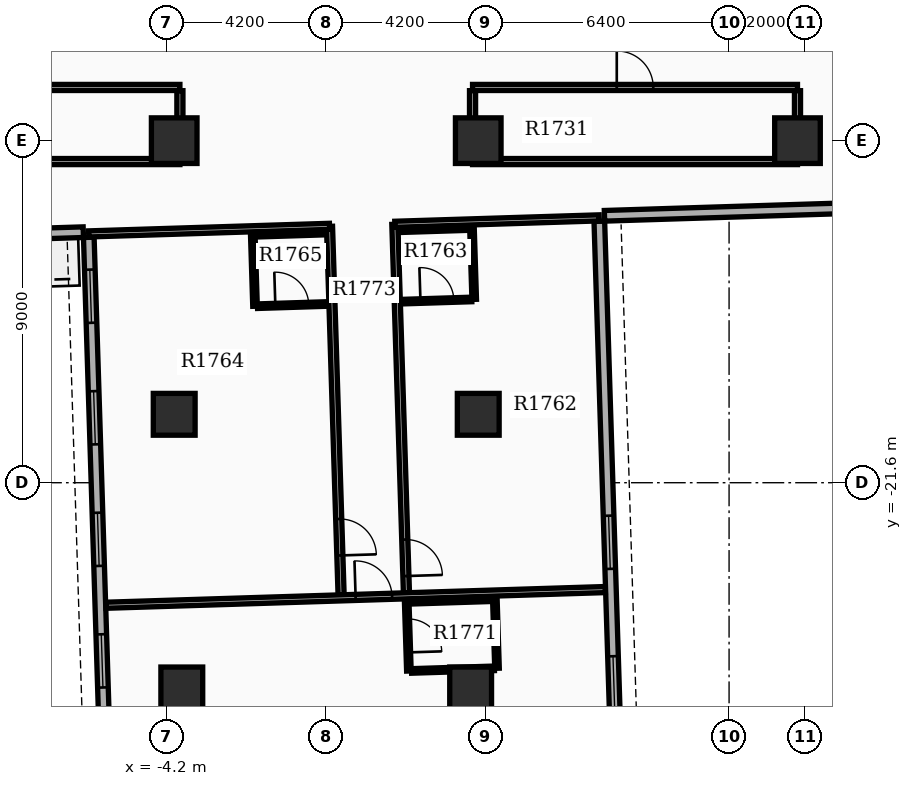
"""IFC4 building model, lengths in metres.
Left out: names, types, materials, properties, quantities, classifications, styles, units other than length and angle.
Written with IfcOpenShell. Run it as: python <this file> out.ifc"""

import sys

from ifc_helpers import new_model, si_unit, direction, frame, frame_2d, origin, origin_2d, place, context, subcontext, project, spatial, rectangle, extrude, element, fill, save


model = new_model("IFC4")
c1 = context("Model", 3, precision=1e-05, world=origin(), true_north=direction((0.0, 1.0)))
c2 = subcontext(c1, "Body", "Model", "MODEL_VIEW")
j1 = project(units=[si_unit("LENGTHUNIT", "METRE"), si_unit("PLANEANGLEUNIT", "RADIAN")], contexts=[c1])
p1 = place(None, origin())
s1 = spatial("IfcSite", under=j1, at=p1, CompositionType="ELEMENT")
p2 = place(p1, origin())
s2 = spatial("IfcBuilding", under=s1, at=p2, CompositionType="ELEMENT")
p3 = place(p2, frame((0.0, 0.0, 112.5)))
s3 = spatial("IfcBuildingStorey", under=s2, at=p3, CompositionType="ELEMENT", Elevation=112.5)
for number, where, z_axis, x_axis in (
    (1, (12.4, -12.6, 0.0), (0.0, 0.0, 1.0), (1.0, 0.0, 0.0)),
    (2, (-4.0, -12.6, 0.0), (0.0, 0.0, 1.0), (1.0, 0.0, 0.0)),
    (3, (4.0, -12.6, 0.0), (0.0, 0.0, 1.0), (1.0, 0.0, 0.0)),
):
    element("IfcColumn", number, at=place(p3, frame(where, z_axis=z_axis, x_axis=x_axis)), inside=s3, PredefinedType="COLUMN", context=c2, shape_type="SweptSolid", body=[
        extrude(rectangle(XDim=1.2, YDim=1.2, at=origin_2d()), origin(), (0.0, 0.0, 1.0), 3.9),
    ])
for number, where, z_axis, x_axis in (
    (4, (-4.0, -19.8, 0.0), (0.0, 0.0, 1.0), (1.0, 0.0, 0.0)),
    (5, (4.0, -19.8, 0.0), (0.0, 0.0, 1.0), (1.0, 0.0, 0.0)),
    (6, (-3.8, -27.0, 0.0), (0.0, 0.0, 1.0), (1.0, 0.0, 0.0)),
    (7, (3.8, -27.0, 0.0), (0.0, 0.0, 1.0), (1.0, 0.0, 0.0)),
):
    element("IfcColumn", number, at=place(p3, frame(where, z_axis=z_axis, x_axis=x_axis)), inside=s3, PredefinedType="COLUMN", context=c2, shape_type="SweptSolid", body=[
        extrude(rectangle(XDim=1.1, YDim=1.1, at=origin_2d()), origin(), (0.0, 0.0, 1.0), 3.9),
    ])
p4 = place(p3, frame((-6.247, -15.144, 0.0), z_axis=(0.0, 0.0, 1.0), x_axis=(0.031398187845, -0.999506955354, 0.0)))
e8 = element("IfcWall", 8, at=p4, inside=s3, PredefinedType="STANDARD", context=c2, shape_type="SweptSolid", body=[
    extrude(rectangle(XDim=20.1, YDim=0.28, at=frame_2d((10.05, 0.0))), origin(), (0.0, 0.0, 1.0), 2.97),
])
p5 = place(p4, frame((0.85, 0.0, 0.8)))
e9 = element("IfcOpeningElement", 9, at=p5, cuts=e8, PredefinedType="OPENING", context=c2, shape_type="SweptSolid", body=[
    extrude(rectangle(XDim=1.4, YDim=1.6, at=frame_2d((0.7, 0.8))), frame((0.0, 0.15, 0.0), z_axis=(0.0, -1.0, 0.0), x_axis=(1.0, 0.0, 0.0)), (0.0, 0.0, 1.0), 0.3),
])
p6 = place(p4, frame((4.05, 0.0, 0.8)))
e10 = element("IfcOpeningElement", 10, at=p6, cuts=e8, PredefinedType="OPENING", context=c2, shape_type="SweptSolid", body=[
    extrude(rectangle(XDim=1.4, YDim=1.6, at=frame_2d((0.7, 0.8))), frame((0.0, 0.15, 0.0), z_axis=(0.0, -1.0, 0.0), x_axis=(1.0, 0.0, 0.0)), (0.0, 0.0, 1.0), 0.3),
])
p7 = place(p4, frame((7.25, 0.0, 0.8)))
e11 = element("IfcOpeningElement", 11, at=p7, cuts=e8, PredefinedType="OPENING", context=c2, shape_type="SweptSolid", body=[
    extrude(rectangle(XDim=1.4, YDim=1.6, at=frame_2d((0.7, 0.8))), frame((0.0, 0.15, 0.0), z_axis=(0.0, -1.0, 0.0), x_axis=(1.0, 0.0, 0.0)), (0.0, 0.0, 1.0), 0.3),
])
p8 = place(p4, frame((10.45, 0.0, 0.8)))
e12 = element("IfcOpeningElement", 12, at=p8, cuts=e8, PredefinedType="OPENING", context=c2, shape_type="SweptSolid", body=[
    extrude(rectangle(XDim=1.4, YDim=1.6, at=frame_2d((0.7, 0.8))), frame((0.0, 0.15, 0.0), z_axis=(0.0, -1.0, 0.0), x_axis=(1.0, 0.0, 0.0)), (0.0, 0.0, 1.0), 0.3),
])
p9 = place(p3, frame((7.817, -34.812, 0.0), z_axis=(0.0, 0.0, 1.0), x_axis=(-0.031410322165, 0.999506574096, 0.0)))
e13 = element("IfcWall", 13, at=p9, inside=s3, PredefinedType="STANDARD", context=c2, shape_type="SweptSolid", body=[
    extrude(rectangle(XDim=20.1, YDim=0.28, at=frame_2d((10.05, 0.0))), origin(), (0.0, 0.0, 1.0), 2.97),
])
p10 = place(p9, frame((0.85, 0.0, 0.8)))
e14 = element("IfcOpeningElement", 14, at=p10, cuts=e13, PredefinedType="OPENING", context=c2, shape_type="SweptSolid", body=[
    extrude(rectangle(XDim=1.4, YDim=1.6, at=frame_2d((0.7, 0.8))), frame((0.0, 0.15, 0.0), z_axis=(0.0, -1.0, 0.0), x_axis=(1.0, 0.0, 0.0)), (0.0, 0.0, 1.0), 0.3),
])
p11 = place(p9, frame((4.05, 0.0, 0.8)))
e15 = element("IfcOpeningElement", 15, at=p11, cuts=e13, PredefinedType="OPENING", context=c2, shape_type="SweptSolid", body=[
    extrude(rectangle(XDim=1.4, YDim=1.6, at=frame_2d((0.7, 0.8))), frame((0.0, 0.15, 0.0), z_axis=(0.0, -1.0, 0.0), x_axis=(1.0, 0.0, 0.0)), (0.0, 0.0, 1.0), 0.3),
])
p12 = place(p9, frame((7.25, 0.0, 0.8)))
e16 = element("IfcOpeningElement", 16, at=p12, cuts=e13, PredefinedType="OPENING", context=c2, shape_type="SweptSolid", body=[
    extrude(rectangle(XDim=1.4, YDim=1.6, at=frame_2d((0.7, 0.8))), frame((0.0, 0.15, 0.0), z_axis=(0.0, -1.0, 0.0), x_axis=(1.0, 0.0, 0.0)), (0.0, 0.0, 1.0), 0.3),
])
p13 = place(p9, frame((10.95, 0.0, 0.8)))
e17 = element("IfcOpeningElement", 17, at=p13, cuts=e13, PredefinedType="OPENING", context=c2, shape_type="SweptSolid", body=[
    extrude(rectangle(XDim=1.4, YDim=1.6, at=frame_2d((0.7, 0.8))), frame((0.0, 0.15, 0.0), z_axis=(0.0, -1.0, 0.0), x_axis=(1.0, 0.0, 0.0)), (0.0, 0.0, 1.0), 0.3),
])
p14 = place(p3, frame((-12.689, -15.206, 0.0), z_axis=(0.0, 0.0, 1.0), x_axis=(0.999507262922, 0.031388395416, 0.0)))
e18 = element("IfcWall", 18, at=p14, inside=s3, PredefinedType="STANDARD", context=c2, shape_type="SweptSolid", body=[
    extrude(rectangle(XDim=6.3, YDim=0.28, at=frame_2d((3.15, 0.0))), origin(), (0.0, 0.0, 1.0), 2.97),
])
p15 = place(p3, frame((13.618, -14.379, 0.0), z_axis=(0.0, 0.0, 1.0), x_axis=(-0.999507224741, -0.031389611199, 0.0)))
e19 = element("IfcWall", 19, at=p15, inside=s3, PredefinedType="STANDARD", context=c2, shape_type="SweptSolid", body=[
    extrude(rectangle(XDim=6.3, YDim=0.28, at=frame_2d((3.15, 0.0))), origin(), (0.0, 0.0, 1.0), 2.97),
])
p16 = place(p3, frame((-12.4, -13.15, 0.0), z_axis=(0.0, 0.0, 1.0), x_axis=(1.0, 0.0, 0.0)))
e20 = element("IfcWall", 20, at=p16, inside=s3, PredefinedType="PARTITIONING", context=c2, shape_type="SweptSolid", body=[
    extrude(rectangle(XDim=8.55, YDim=0.16, at=frame_2d((4.275, 0.0))), origin(), (0.0, 0.0, 1.0), 2.96),
])
p17 = place(p3, frame((-12.4, -11.2, 0.0), z_axis=(0.0, 0.0, 1.0), x_axis=(1.0, 0.0, 0.0)))
e21 = element("IfcWall", 21, at=p17, inside=s3, PredefinedType="PARTITIONING", context=c2, shape_type="SweptSolid", body=[
    extrude(rectangle(XDim=8.55, YDim=0.16, at=frame_2d((4.275, 0.0))), origin(), (0.0, 0.0, 1.0), 2.96),
])
p18 = place(p17, frame((3.795, 0.0, 0.0)))
e22 = element("IfcOpeningElement", 22, at=p18, cuts=e21, PredefinedType="OPENING", context=c2, shape_type="SweptSolid", body=[
    extrude(rectangle(XDim=0.96, YDim=2.15, at=frame_2d((0.48, 1.075))), frame((0.0, 0.09, 0.0), z_axis=(0.0, -1.0, 0.0), x_axis=(1.0, 0.0, 0.0)), (0.0, 0.0, 1.0), 0.18),
])
p19 = place(p3, frame((-3.85, -13.065, 0.0), z_axis=(0.0, 0.0, 1.0), x_axis=(0.0, 1.0, 0.0)))
e23 = element("IfcWall", 23, at=p19, inside=s3, PredefinedType="PARTITIONING", context=c2, shape_type="SweptSolid", body=[
    extrude(rectangle(XDim=1.78, YDim=0.16, at=frame_2d((0.89, 0.0))), origin(), (0.0, 0.0, 1.0), 2.96),
])
p20 = place(p3, frame((3.85, -13.15, 0.0), z_axis=(0.0, 0.0, 1.0), x_axis=(1.0, 0.0, 0.0)))
e24 = element("IfcWall", 24, at=p20, inside=s3, PredefinedType="PARTITIONING", context=c2, shape_type="SweptSolid", body=[
    extrude(rectangle(XDim=8.55, YDim=0.16, at=frame_2d((4.275, 0.0))), origin(), (0.0, 0.0, 1.0), 2.96),
])
p21 = place(p3, frame((3.85, -11.2, 0.0), z_axis=(0.0, 0.0, 1.0), x_axis=(1.0, 0.0, 0.0)))
e25 = element("IfcWall", 25, at=p21, inside=s3, PredefinedType="PARTITIONING", context=c2, shape_type="SweptSolid", body=[
    extrude(rectangle(XDim=8.55, YDim=0.16, at=frame_2d((4.275, 0.0))), origin(), (0.0, 0.0, 1.0), 2.96),
])
p22 = place(p21, frame((3.795, 0.0, 0.0)))
e26 = element("IfcOpeningElement", 26, at=p22, cuts=e25, PredefinedType="OPENING", context=c2, shape_type="SweptSolid", body=[
    extrude(rectangle(XDim=0.96, YDim=2.15, at=frame_2d((0.48, 1.075))), frame((0.0, 0.09, 0.0), z_axis=(0.0, -1.0, 0.0), x_axis=(1.0, 0.0, 0.0)), (0.0, 0.0, 1.0), 0.18),
])
for number, where, z_axis, x_axis in (
    (27, (3.85, -13.065, 0.0), (0.0, 0.0, 1.0), (0.0, 1.0, 0.0)),
    (28, (12.4, -13.065, 0.0), (0.0, 0.0, 1.0), (0.0, 1.0, 0.0)),
):
    element("IfcWall", number, at=place(p3, frame(where, z_axis=z_axis, x_axis=x_axis)), inside=s3, PredefinedType="PARTITIONING", context=c2, shape_type="SweptSolid", body=[
        extrude(rectangle(XDim=1.78, YDim=0.16, at=frame_2d((0.89, 0.0))), origin(), (0.0, 0.0, 1.0), 2.96),
    ])
p23 = place(p3, frame((1.806, -14.801, 0.0), z_axis=(0.0, 0.0, 1.0), x_axis=(0.031410762168, -0.999506560269, 0.0)))
e29 = element("IfcWall", 29, at=p23, inside=s3, PredefinedType="PARTITIONING", context=c2, shape_type="SweptSolid", body=[
    extrude(rectangle(XDim=9.7, YDim=0.16, at=frame_2d((4.85, 0.0))), origin(), (0.0, 0.0, 1.0), 2.96),
])
p24 = place(p23, frame((8.3, 0.0, 0.0)))
e30 = element("IfcOpeningElement", 30, at=p24, cuts=e29, PredefinedType="OPENING", context=c2, shape_type="SweptSolid", body=[
    extrude(rectangle(XDim=0.96, YDim=2.15, at=frame_2d((0.48, 1.075))), frame((0.0, 0.09, 0.0), z_axis=(0.0, -1.0, 0.0), x_axis=(1.0, 0.0, 0.0)), (0.0, 0.0, 1.0), 0.18),
])
p25 = place(p3, frame((1.806, -14.801, 0.0), z_axis=(0.0, 0.0, 1.0), x_axis=(0.999506793296, 0.031403346241, 0.0)))
e31 = element("IfcWall", 31, at=p25, inside=s3, PredefinedType="PARTITIONING", context=c2, shape_type="SweptSolid", body=[
    extrude(rectangle(XDim=5.38, YDim=0.16, at=frame_2d((2.69, 0.0))), origin(), (0.0, 0.0, 1.0), 2.96),
])
p26 = place(p3, frame((2.01, -16.835, 0.0), z_axis=(0.0, 0.0, 1.0), x_axis=(0.999507221803, 0.031389704724, 0.0)))
e32 = element("IfcWall", 32, at=p26, inside=s3, PredefinedType="PARTITIONING", context=c2, shape_type="SweptSolid", body=[
    extrude(rectangle(XDim=1.82, YDim=0.12, at=frame_2d((0.91, 0.0))), origin(), (0.0, 0.0, 1.0), 2.96),
])
p27 = place(p26, frame((0.47, 0.0, 0.0)))
e33 = element("IfcOpeningElement", 33, at=p27, cuts=e32, PredefinedType="OPENING", context=c2, shape_type="SweptSolid", body=[
    extrude(rectangle(XDim=0.88, YDim=2.1, at=frame_2d((0.44, 1.05))), frame((0.0, 0.07, 0.0), z_axis=(0.0, -1.0, 0.0), x_axis=(1.0, 0.0, 0.0)), (0.0, 0.0, 1.0), 0.14),
])
p28 = place(p3, frame((1.951, -14.956, 0.0), z_axis=(0.0, 0.0, 1.0), x_axis=(0.999507221803, 0.031389704724, 0.0)))
e34 = element("IfcWall", 34, at=p28, inside=s3, PredefinedType="PARTITIONING", context=c2, shape_type="SweptSolid", body=[
    extrude(rectangle(XDim=1.82, YDim=0.12, at=frame_2d((0.91, 0.0))), origin(), (0.0, 0.0, 1.0), 2.96),
])
p29 = place(p3, frame((3.835, -14.897, 0.0), z_axis=(0.0, 0.0, 1.0), x_axis=(0.031429371883, -0.999505975261, 0.0)))
e35 = element("IfcWall", 35, at=p29, inside=s3, PredefinedType="PARTITIONING", context=c2, shape_type="SweptSolid", body=[
    extrude(rectangle(XDim=1.88, YDim=0.12, at=frame_2d((0.94, 0.0))), origin(), (0.0, 0.0, 1.0), 2.96),
])
p30 = place(p3, frame((0.087, -14.854, 0.0), z_axis=(0.0, 0.0, 1.0), x_axis=(0.031410762168, -0.999506560269, 0.0)))
e36 = element("IfcWall", 36, at=p30, inside=s3, PredefinedType="PARTITIONING", context=c2, shape_type="SweptSolid", body=[
    extrude(rectangle(XDim=9.7, YDim=0.16, at=frame_2d((4.85, 0.0))), origin(), (0.0, 0.0, 1.0), 2.96),
])
p31 = place(p30, frame((7.704, 0.0, 0.0)))
e37 = element("IfcOpeningElement", 37, at=p31, cuts=e36, PredefinedType="OPENING", context=c2, shape_type="SweptSolid", body=[
    extrude(rectangle(XDim=0.96, YDim=2.15, at=frame_2d((0.48, 1.075))), frame((0.0, 0.09, 0.0), z_axis=(0.0, -1.0, 0.0), x_axis=(1.0, 0.0, 0.0)), (0.0, 0.0, 1.0), 0.18),
])
p32 = place(p3, frame((0.087, -14.854, 0.0), z_axis=(0.0, 0.0, 1.0), x_axis=(-0.999506197806, -0.031422293782, 0.0)))
e38 = element("IfcWall", 38, at=p32, inside=s3, PredefinedType="PARTITIONING", context=c2, shape_type="SweptSolid", body=[
    extrude(rectangle(XDim=6.34, YDim=0.16, at=frame_2d((3.17, 0.0))), origin(), (0.0, 0.0, 1.0), 2.96),
])
p33 = place(p3, frame((-1.808, -16.955, 0.0), z_axis=(0.0, 0.0, 1.0), x_axis=(0.999507221803, 0.031389704724, 0.0)))
e39 = element("IfcWall", 39, at=p33, inside=s3, PredefinedType="PARTITIONING", context=c2, shape_type="SweptSolid", body=[
    extrude(rectangle(XDim=1.82, YDim=0.12, at=frame_2d((0.91, 0.0))), origin(), (0.0, 0.0, 1.0), 2.96),
])
p34 = place(p33, frame((0.47, 0.0, 0.0)))
e40 = element("IfcOpeningElement", 40, at=p34, cuts=e39, PredefinedType="OPENING", context=c2, shape_type="SweptSolid", body=[
    extrude(rectangle(XDim=0.88, YDim=2.1, at=frame_2d((0.44, 1.05))), frame((0.0, 0.07, 0.0), z_axis=(0.0, -1.0, 0.0), x_axis=(1.0, 0.0, 0.0)), (0.0, 0.0, 1.0), 0.14),
])
p35 = place(p3, frame((-1.867, -15.076, 0.0), z_axis=(0.0, 0.0, 1.0), x_axis=(0.999503004171, 0.03152371574, 0.0)))
e41 = element("IfcWall", 41, at=p35, inside=s3, PredefinedType="PARTITIONING", context=c2, shape_type="SweptSolid", body=[
    extrude(rectangle(XDim=1.82, YDim=0.12, at=frame_2d((0.91, 0.0))), origin(), (0.0, 0.0, 1.0), 2.96),
])
p36 = place(p3, frame((-1.932, -15.078, 0.0), z_axis=(0.0, 0.0, 1.0), x_axis=(0.031425292588, -0.999506103526, 0.0)))
e42 = element("IfcWall", 42, at=p36, inside=s3, PredefinedType="PARTITIONING", context=c2, shape_type="SweptSolid", body=[
    extrude(rectangle(XDim=1.88, YDim=0.12, at=frame_2d((0.94, 0.0))), origin(), (0.0, 0.0, 1.0), 2.96),
])
p37 = place(p3, frame((-5.795, -24.824, 0.0), z_axis=(0.0, 0.0, 1.0), x_axis=(0.999507189267, 0.031390740738, 0.0)))
e43 = element("IfcWall", 43, at=p37, inside=s3, PredefinedType="PARTITIONING", context=c2, shape_type="SweptSolid", body=[
    extrude(rectangle(XDim=13.144, YDim=0.16, at=frame_2d((6.572, 0.0))), origin(), (0.0, 0.0, 1.0), 2.96),
])
p38 = place(p37, frame((6.572, 0.0, 0.0)))
e44 = element("IfcOpeningElement", 44, at=p38, cuts=e43, PredefinedType="OPENING", context=c2, shape_type="SweptSolid", body=[
    extrude(rectangle(XDim=0.96, YDim=2.15, at=frame_2d((0.48, 1.075))), frame((0.0, 0.09, 0.0), z_axis=(0.0, -1.0, 0.0), x_axis=(1.0, 0.0, 0.0)), (0.0, 0.0, 1.0), 0.18),
])
p39 = place(p3, frame((2.118, -24.736, 0.0), z_axis=(0.0, 0.0, 1.0), x_axis=(0.03152371574, -0.999503004171, 0.0)))
e45 = element("IfcWall", 45, at=p39, inside=s3, PredefinedType="PARTITIONING", context=c2, shape_type="SweptSolid", body=[
    extrude(rectangle(XDim=1.82, YDim=0.12, at=frame_2d((0.91, 0.0))), origin(), (0.0, 0.0, 1.0), 2.96),
])
p40 = place(p39, frame((0.45, 0.0, 0.0)))
e46 = element("IfcOpeningElement", 46, at=p40, cuts=e45, PredefinedType="OPENING", context=c2, shape_type="SweptSolid", body=[
    extrude(rectangle(XDim=0.88, YDim=2.1, at=frame_2d((0.44, 1.05))), frame((0.0, 0.07, 0.0), z_axis=(0.0, -1.0, 0.0), x_axis=(1.0, 0.0, 0.0)), (0.0, 0.0, 1.0), 0.14),
])
p41 = place(p3, frame((4.437, -24.663, 0.0), z_axis=(0.0, 0.0, 1.0), x_axis=(0.031255692016, -0.999511421504, 0.0)))
e47 = element("IfcWall", 47, at=p41, inside=s3, PredefinedType="PARTITIONING", context=c2, shape_type="SweptSolid", body=[
    extrude(rectangle(XDim=1.82, YDim=0.12, at=frame_2d((0.91, 0.0))), origin(), (0.0, 0.0, 1.0), 2.96),
])
for number, where, z_axis, x_axis in (
    (48, (2.188, -24.733, 0.0), (0.0, 0.0, 1.0), (1.0, 0.031, 0.0)),
    (49, (2.245, -26.552, 0.0), (0.0, 0.0, 1.0), (1.0, 0.031, 0.0)),
):
    element("IfcWall", number, at=place(p3, frame(where, z_axis=z_axis, x_axis=x_axis)), inside=s3, PredefinedType="PARTITIONING", context=c2, shape_type="SweptSolid", body=[
        extrude(rectangle(XDim=2.18, YDim=0.12, at=frame_2d((1.09, 0.0))), origin(), (0.0, 0.0, 1.0), 2.96),
    ])
p42 = place(p5, origin())
e50 = element("IfcWindow", 50, at=p42, inside=s3, PartitioningType="SINGLE_PANEL", PredefinedType="WINDOW", context=c2, shape_type="SweptSolid", body=[
    extrude(rectangle(XDim=1.4, YDim=1.6, at=frame_2d((0.7, 0.8))), frame((0.0, 0.03, 0.0), z_axis=(0.0, -1.0, 0.0), x_axis=(1.0, 0.0, 0.0)), (0.0, 0.0, 1.0), 0.06),
])
fill(e9, e50)
p43 = place(p6, origin())
e51 = element("IfcWindow", 51, at=p43, inside=s3, PartitioningType="SINGLE_PANEL", PredefinedType="WINDOW", context=c2, shape_type="SweptSolid", body=[
    extrude(rectangle(XDim=1.4, YDim=1.6, at=frame_2d((0.7, 0.8))), frame((0.0, 0.03, 0.0), z_axis=(0.0, -1.0, 0.0), x_axis=(1.0, 0.0, 0.0)), (0.0, 0.0, 1.0), 0.06),
])
fill(e10, e51)
p44 = place(p7, origin())
e52 = element("IfcWindow", 52, at=p44, inside=s3, PartitioningType="SINGLE_PANEL", PredefinedType="WINDOW", context=c2, shape_type="SweptSolid", body=[
    extrude(rectangle(XDim=1.4, YDim=1.6, at=frame_2d((0.7, 0.8))), frame((0.0, 0.03, 0.0), z_axis=(0.0, -1.0, 0.0), x_axis=(1.0, 0.0, 0.0)), (0.0, 0.0, 1.0), 0.06),
])
fill(e11, e52)
p45 = place(p8, origin())
e53 = element("IfcWindow", 53, at=p45, inside=s3, PartitioningType="SINGLE_PANEL", PredefinedType="WINDOW", context=c2, shape_type="SweptSolid", body=[
    extrude(rectangle(XDim=1.4, YDim=1.6, at=frame_2d((0.7, 0.8))), frame((0.0, 0.03, 0.0), z_axis=(0.0, -1.0, 0.0), x_axis=(1.0, 0.0, 0.0)), (0.0, 0.0, 1.0), 0.06),
])
fill(e12, e53)
p46 = place(p12, origin())
e54 = element("IfcWindow", 54, at=p46, inside=s3, PartitioningType="SINGLE_PANEL", PredefinedType="WINDOW", context=c2, shape_type="SweptSolid", body=[
    extrude(rectangle(XDim=1.4, YDim=1.6, at=frame_2d((0.7, 0.8))), frame((0.0, 0.03, 0.0), z_axis=(0.0, -1.0, 0.0), x_axis=(1.0, 0.0, 0.0)), (0.0, 0.0, 1.0), 0.06),
])
fill(e16, e54)
p47 = place(p13, origin())
e55 = element("IfcWindow", 55, at=p47, inside=s3, PartitioningType="SINGLE_PANEL", PredefinedType="WINDOW", context=c2, shape_type="SweptSolid", body=[
    extrude(rectangle(XDim=1.4, YDim=1.6, at=frame_2d((0.7, 0.8))), frame((0.0, 0.03, 0.0), z_axis=(0.0, -1.0, 0.0), x_axis=(1.0, 0.0, 0.0)), (0.0, 0.0, 1.0), 0.06),
])
fill(e17, e55)
p48 = place(p22, origin())
e56 = element("IfcDoor", 56, at=p48, inside=s3, OperationType="SINGLE_SWING_LEFT", PredefinedType="DOOR", context=c2, shape_type="SweptSolid", body=[
    extrude(rectangle(XDim=0.96, YDim=2.15, at=frame_2d((0.48, 1.075))), frame((0.0, 0.025, 0.0), z_axis=(0.0, -1.0, 0.0), x_axis=(1.0, 0.0, 0.0)), (0.0, 0.0, 1.0), 0.05),
])
fill(e26, e56)
p49 = place(p24, origin())
e57 = element("IfcDoor", 57, at=p49, inside=s3, OperationType="SINGLE_SWING_RIGHT", PredefinedType="DOOR", context=c2, shape_type="SweptSolid", body=[
    extrude(rectangle(XDim=0.96, YDim=2.15, at=frame_2d((0.48, 1.075))), frame((0.0, 0.025, 0.0), z_axis=(0.0, -1.0, 0.0), x_axis=(1.0, 0.0, 0.0)), (0.0, 0.0, 1.0), 0.05),
])
fill(e30, e57)
p50 = place(p27, origin())
e58 = element("IfcDoor", 58, at=p50, inside=s3, OperationType="SINGLE_SWING_LEFT", PredefinedType="DOOR", context=c2, shape_type="SweptSolid", body=[
    extrude(rectangle(XDim=0.88, YDim=2.1, at=frame_2d((0.44, 1.05))), frame((0.0, 0.025, 0.0), z_axis=(0.0, -1.0, 0.0), x_axis=(1.0, 0.0, 0.0)), (0.0, 0.0, 1.0), 0.05),
])
fill(e33, e58)
p51 = place(p31, origin())
e59 = element("IfcDoor", 59, at=p51, inside=s3, OperationType="SINGLE_SWING_RIGHT", PredefinedType="DOOR", context=c2, shape_type="SweptSolid", body=[
    extrude(rectangle(XDim=0.96, YDim=2.15, at=frame_2d((0.48, 1.075))), frame((0.0, 0.025, 0.0), z_axis=(0.0, -1.0, 0.0), x_axis=(1.0, 0.0, 0.0)), (0.0, 0.0, 1.0), 0.05),
])
fill(e37, e59)
p52 = place(p34, origin())
e60 = element("IfcDoor", 60, at=p52, inside=s3, OperationType="SINGLE_SWING_LEFT", PredefinedType="DOOR", context=c2, shape_type="SweptSolid", body=[
    extrude(rectangle(XDim=0.88, YDim=2.1, at=frame_2d((0.44, 1.05))), frame((0.0, 0.025, 0.0), z_axis=(0.0, -1.0, 0.0), x_axis=(1.0, 0.0, 0.0)), (0.0, 0.0, 1.0), 0.05),
])
fill(e40, e60)
p53 = place(p38, origin())
e61 = element("IfcDoor", 61, at=p53, inside=s3, OperationType="SINGLE_SWING_LEFT", PredefinedType="DOOR", context=c2, shape_type="SweptSolid", body=[
    extrude(rectangle(XDim=0.96, YDim=2.15, at=frame_2d((0.48, 1.075))), frame((0.0, 0.025, 0.0), z_axis=(0.0, -1.0, 0.0), x_axis=(1.0, 0.0, 0.0)), (0.0, 0.0, 1.0), 0.05),
])
fill(e44, e61)
p54 = place(p40, origin())
e62 = element("IfcDoor", 62, at=p54, inside=s3, OperationType="SINGLE_SWING_RIGHT", PredefinedType="DOOR", context=c2, shape_type="SweptSolid", body=[
    extrude(rectangle(XDim=0.88, YDim=2.1, at=frame_2d((0.44, 1.05))), frame((0.0, 0.025, 0.0), z_axis=(0.0, -1.0, 0.0), x_axis=(1.0, 0.0, 0.0)), (0.0, 0.0, 1.0), 0.05),
])
fill(e46, e62)
save(model, sys.argv[1])
